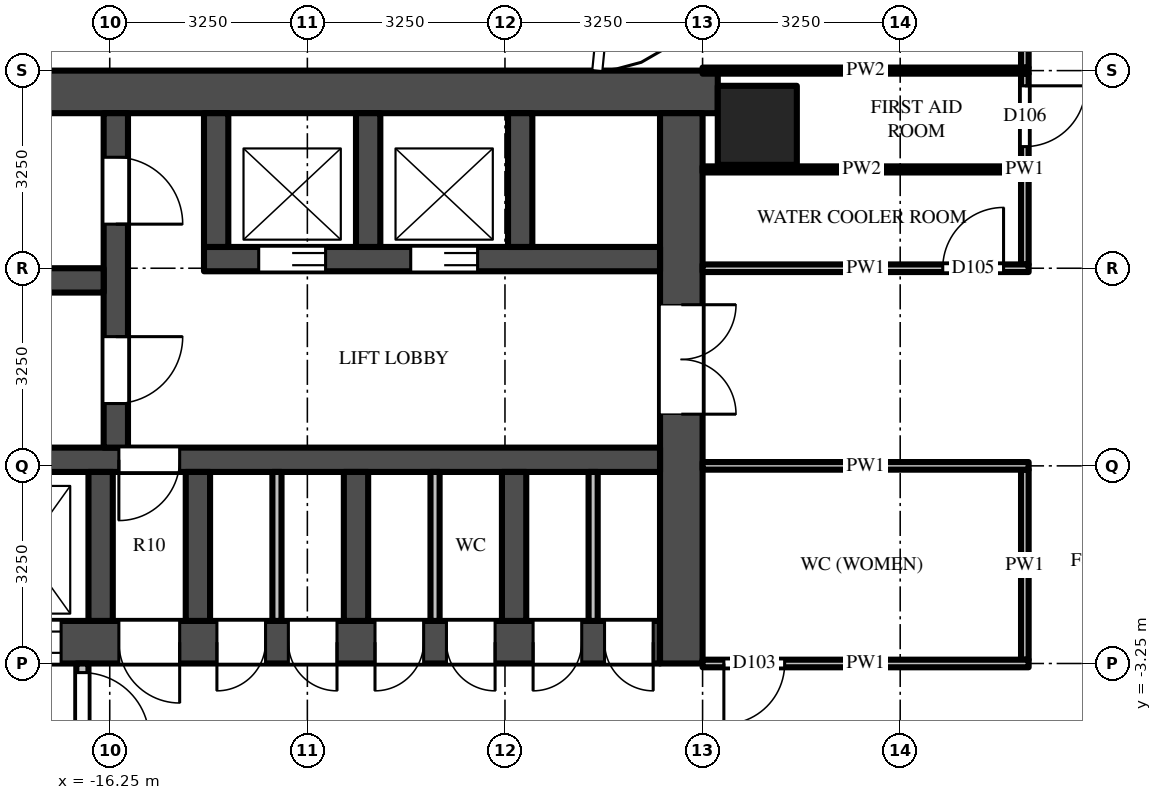
"""IFC4 building model, lengths in metres.
Left out: names, types, materials, properties, quantities, classifications, styles, units other than length and angle.
Written with IfcOpenShell. Run it as: python <this file> out.ifc"""

import sys

from ifc_helpers import new_model, si_unit, direction, frame, frame_2d, origin, origin_2d, place, context, subcontext, project, spatial, rectangle, extrude, source, transform, mapped, element, fill, save


model = new_model("IFC4")
c1 = context("Model", 3, precision=1e-05, world=origin(), true_north=direction((0.0, 1.0)))
c2 = subcontext(c1, "Body", "Model", "MODEL_VIEW")
j1 = project(units=[si_unit("LENGTHUNIT", "METRE"), si_unit("PLANEANGLEUNIT", "RADIAN")], contexts=[c1])
p1 = place(None, origin())
s1 = spatial("IfcSite", under=j1, at=p1, CompositionType="ELEMENT")
p2 = place(p1, origin())
s2 = spatial("IfcBuilding", under=s1, at=p2, CompositionType="ELEMENT")
p3 = place(p2, frame((0.0, 0.0, 120.0)))
s3 = spatial("IfcBuildingStorey", under=s2, at=p3, CompositionType="ELEMENT", Elevation=120.0)
m1 = source(origin(), c2, "Body", "SweptSolid", [
    extrude(rectangle(XDim=1.3, YDim=1.3, at=origin_2d()), origin(), (0.0, 0.0, 1.0), 4.5),
])
p4 = place(p3, frame((-5.6, 5.6, 0.0), z_axis=(0.0, 0.0, 1.0), x_axis=(1.0, 0.0, 0.0)))
e1 = element("IfcColumn", 1, at=p4, inside=s3, PredefinedType="COLUMN", context=c2, shape_type="MappedRepresentation", body=[
    mapped(m1, transform((0.0, 0.0, 0.0))),
])
m2 = source(origin(), c2, "Body", "SweptSolid", [
    extrude(rectangle(XDim=16.5, YDim=0.7, at=frame_2d((8.25, 0.0))), origin(), (0.0, 0.0, 1.0), 4.25),
])
p5 = place(p3, frame((-6.25, 6.15, 0.0), z_axis=(0.0, 0.0, 1.0), x_axis=(-1.0, 0.0, 0.0)))
e2 = element("IfcWall", 2, at=p5, inside=s3, PredefinedType="SHEAR", context=c2, shape_type="MappedRepresentation", body=[
    mapped(m2, transform((0.0, 0.0, 0.0))),
])
m3 = source(origin(), c2, "Body", "SweptSolid", [
    extrude(rectangle(XDim=14.85, YDim=0.7, at=frame_2d((7.425, 0.0))), origin(), (0.0, 0.0, 1.0), 4.25),
])
p6 = place(p3, frame((-7.2, -2.9, 0.0), z_axis=(0.0, 0.0, 1.0), x_axis=(-1.0, 0.0, 0.0)))
e3 = element("IfcWall", 3, at=p6, inside=s3, PredefinedType="SHEAR", context=c2, shape_type="MappedRepresentation", body=[
    mapped(m3, transform((0.0, 0.0, 0.0))),
])
m4 = source(origin(), c2, "Body", "SweptSolid", [
    extrude(rectangle(XDim=1.3, YDim=2.1, at=frame_2d((0.65, 1.05))), frame((0.0, 0.36, 0.0), z_axis=(0.0, -1.0, 0.0), x_axis=(1.0, 0.0, 0.0)), (0.0, 0.0, 1.0), 0.72),
])
p7 = place(p6, frame((12.2, 0.0, 0.0)))
e4 = element("IfcOpeningElement", 4, at=p7, cuts=e3, PredefinedType="OPENING", context=c2, shape_type="MappedRepresentation", body=[
    mapped(m4, transform((0.0, 0.0, 0.0))),
])
m5 = source(origin(), c2, "Body", "SweptSolid", [
    extrude(rectangle(XDim=1.2, YDim=2.1, at=frame_2d((0.6, 1.05))), frame((0.0, 0.36, 0.0), z_axis=(0.0, -1.0, 0.0), x_axis=(1.0, 0.0, 0.0)), (0.0, 0.0, 1.0), 0.72),
])
p8 = place(p6, frame((9.85, 0.0, 0.0)))
e5 = element("IfcOpeningElement", 5, at=p8, cuts=e3, PredefinedType="OPENING", context=c2, shape_type="MappedRepresentation", body=[
    mapped(m5, transform((0.0, 0.0, 0.0))),
])
m6 = source(origin(), c2, "Body", "SweptSolid", [
    extrude(rectangle(XDim=1.0, YDim=2.1, at=frame_2d((0.5, 1.05))), frame((0.0, 0.36, 0.0), z_axis=(0.0, -1.0, 0.0), x_axis=(1.0, 0.0, 0.0)), (0.0, 0.0, 1.0), 0.72),
])
p9 = place(p6, frame((7.9, 0.0, 0.0)))
e6 = element("IfcOpeningElement", 6, at=p9, cuts=e3, PredefinedType="OPENING", context=c2, shape_type="MappedRepresentation", body=[
    mapped(m6, transform((0.0, 0.0, 0.0))),
])
m7 = source(origin(), c2, "Body", "SweptSolid", [
    extrude(rectangle(XDim=0.8, YDim=2.1, at=frame_2d((0.4, 1.05))), frame((0.0, 0.36, 0.0), z_axis=(0.0, -1.0, 0.0), x_axis=(1.0, 0.0, 0.0)), (0.0, 0.0, 1.0), 0.72),
])
p10 = place(p6, frame((0.113, 0.0, 0.0)))
e7 = element("IfcOpeningElement", 7, at=p10, cuts=e3, PredefinedType="OPENING", context=c2, shape_type="MappedRepresentation", body=[
    mapped(m7, transform((0.0, 0.0, 0.0))),
])
p11 = place(p6, frame((1.288, 0.0, 0.0)))
e8 = element("IfcOpeningElement", 8, at=p11, cuts=e3, PredefinedType="OPENING", context=c2, shape_type="MappedRepresentation", body=[
    mapped(m7, transform((0.0, 0.0, 0.0))),
])
p12 = place(p6, frame((2.712, 0.0, 0.0)))
e9 = element("IfcOpeningElement", 9, at=p12, cuts=e3, PredefinedType="OPENING", context=c2, shape_type="MappedRepresentation", body=[
    mapped(m7, transform((0.0, 0.0, 0.0))),
])
p13 = place(p6, frame((3.887, 0.0, 0.0)))
e10 = element("IfcOpeningElement", 10, at=p13, cuts=e3, PredefinedType="OPENING", context=c2, shape_type="MappedRepresentation", body=[
    mapped(m7, transform((0.0, 0.0, 0.0))),
])
p14 = place(p6, frame((5.312, 0.0, 0.0)))
e11 = element("IfcOpeningElement", 11, at=p14, cuts=e3, PredefinedType="OPENING", context=c2, shape_type="MappedRepresentation", body=[
    mapped(m7, transform((0.0, 0.0, 0.0))),
])
p15 = place(p6, frame((6.488, 0.0, 0.0)))
e12 = element("IfcOpeningElement", 12, at=p15, cuts=e3, PredefinedType="OPENING", context=c2, shape_type="MappedRepresentation", body=[
    mapped(m7, transform((0.0, 0.0, 0.0))),
])
m8 = source(origin(), c2, "Body", "SweptSolid", [
    extrude(rectangle(XDim=9.05, YDim=0.7, at=frame_2d((4.525, 0.0))), origin(), (0.0, 0.0, 1.0), 4.25),
])
p16 = place(p3, frame((-6.85, 5.8, 0.0), z_axis=(0.0, 0.0, 1.0), x_axis=(0.0, -1.0, 0.0)))
e13 = element("IfcWall", 13, at=p16, inside=s3, PredefinedType="SHEAR", context=c2, shape_type="MappedRepresentation", body=[
    mapped(m8, transform((0.0, 0.0, 0.0))),
])
m9 = source(origin(), c2, "Body", "SweptSolid", [
    extrude(rectangle(XDim=1.8, YDim=2.1, at=frame_2d((0.9, 1.05))), frame((0.0, 0.36, 0.0), z_axis=(0.0, -1.0, 0.0), x_axis=(1.0, 0.0, 0.0)), (0.0, 0.0, 1.0), 0.72),
])
p17 = place(p16, frame((3.15, 0.0, 0.0)))
e14 = element("IfcOpeningElement", 14, at=p17, cuts=e13, PredefinedType="OPENING", context=c2, shape_type="MappedRepresentation", body=[
    mapped(m9, transform((0.0, 0.0, 0.0))),
])
m10 = source(origin(), c2, "Body", "SweptSolid", [
    extrude(rectangle(XDim=7.5, YDim=0.4, at=frame_2d((3.75, 0.0))), origin(), (0.0, 0.0, 1.0), 4.25),
])
p18 = place(p3, frame((-7.2, 3.4, 0.0), z_axis=(0.0, 0.0, 1.0), x_axis=(-1.0, 0.0, 0.0)))
e15 = element("IfcWall", 15, at=p18, inside=s3, PredefinedType="SHEAR", context=c2, shape_type="MappedRepresentation", body=[
    mapped(m10, transform((0.0, 0.0, 0.0))),
])
m11 = source(origin(), c2, "Body", "SweptSolid", [
    extrude(rectangle(XDim=1.1, YDim=2.1, at=frame_2d((0.55, 1.05))), frame((0.0, 0.21, 0.0), z_axis=(0.0, -1.0, 0.0), x_axis=(1.0, 0.0, 0.0)), (0.0, 0.0, 1.0), 0.42),
])
p19 = place(p18, frame((3.0, 0.0, 0.0)))
e16 = element("IfcOpeningElement", 16, at=p19, cuts=e15, PredefinedType="OPENING", context=c2, shape_type="MappedRepresentation", body=[
    mapped(m11, transform((0.0, 0.0, 0.0))),
])
p20 = place(p18, frame((5.5, 0.0, 0.0)))
e17 = element("IfcOpeningElement", 17, at=p20, cuts=e15, PredefinedType="OPENING", context=c2, shape_type="MappedRepresentation", body=[
    mapped(m11, transform((0.0, 0.0, 0.0))),
])
m12 = source(origin(), c2, "Body", "SweptSolid", [
    extrude(rectangle(XDim=14.85, YDim=0.4, at=frame_2d((7.425, 0.0))), origin(), (0.0, 0.0, 1.0), 4.25),
])
p21 = place(p3, frame((-7.2, 0.1, 0.0), z_axis=(0.0, 0.0, 1.0), x_axis=(-1.0, 0.0, 0.0)))
e18 = element("IfcWall", 18, at=p21, inside=s3, PredefinedType="SHEAR", context=c2, shape_type="MappedRepresentation", body=[
    mapped(m12, transform((0.0, 0.0, 0.0))),
])
m13 = source(origin(), c2, "Body", "SweptSolid", [
    extrude(rectangle(XDim=1.0, YDim=2.1, at=frame_2d((0.5, 1.05))), frame((0.0, 0.21, 0.0), z_axis=(0.0, -1.0, 0.0), x_axis=(1.0, 0.0, 0.0)), (0.0, 0.0, 1.0), 0.42),
])
p22 = place(p21, frame((7.9, 0.0, 0.0)))
e19 = element("IfcOpeningElement", 19, at=p22, cuts=e18, PredefinedType="OPENING", context=c2, shape_type="MappedRepresentation", body=[
    mapped(m13, transform((0.0, 0.0, 0.0))),
])
m14 = source(origin(), c2, "Body", "SweptSolid", [
    extrude(rectangle(XDim=5.5, YDim=0.4, at=frame_2d((2.75, 0.0))), origin(), (0.0, 0.0, 1.0), 4.25),
])
p23 = place(p3, frame((-16.15, 5.8, 0.0), z_axis=(0.0, 0.0, 1.0), x_axis=(0.0, -1.0, 0.0)))
e20 = element("IfcWall", 20, at=p23, inside=s3, PredefinedType="SHEAR", context=c2, shape_type="MappedRepresentation", body=[
    mapped(m14, transform((0.0, 0.0, 0.0))),
])
p24 = place(p23, frame((0.725, 0.0, 0.0)))
e21 = element("IfcOpeningElement", 21, at=p24, cuts=e20, PredefinedType="OPENING", context=c2, shape_type="MappedRepresentation", body=[
    mapped(m11, transform((0.0, 0.0, 0.0))),
])
p25 = place(p23, frame((3.675, 0.0, 0.0)))
e22 = element("IfcOpeningElement", 22, at=p25, cuts=e20, PredefinedType="OPENING", context=c2, shape_type="MappedRepresentation", body=[
    mapped(m11, transform((0.0, 0.0, 0.0))),
])
m15 = source(origin(), c2, "Body", "SweptSolid", [
    extrude(rectangle(XDim=5.7, YDim=0.4, at=frame_2d((2.85, 0.0))), origin(), (0.0, 0.0, 1.0), 4.25),
])
p26 = place(p3, frame((-16.35, 3.05, 0.0), z_axis=(0.0, 0.0, 1.0), x_axis=(-1.0, 0.0, 0.0)))
e23 = element("IfcWall", 23, at=p26, inside=s3, PredefinedType="SHEAR", context=c2, shape_type="MappedRepresentation", body=[
    mapped(m15, transform((0.0, 0.0, 0.0))),
])
m16 = source(origin(), c2, "Body", "SweptSolid", [
    extrude(rectangle(XDim=2.2, YDim=0.4, at=frame_2d((1.1, 0.0))), origin(), (0.0, 0.0, 1.0), 4.25),
])
for number, where, z_axis, x_axis in (
    (24, (-9.5, 5.8, 0.0), (0.0, 0.0, 1.0), (0.0, -1.0, 0.0)),
    (25, (-12.0, 5.8, 0.0), (0.0, 0.0, 1.0), (0.0, -1.0, 0.0)),
    (26, (-14.5, 5.8, 0.0), (0.0, 0.0, 1.0), (0.0, -1.0, 0.0)),
):
    element("IfcWall", number, at=place(p3, frame(where, z_axis=z_axis, x_axis=x_axis)), inside=s3, PredefinedType="SHEAR", context=c2, shape_type="MappedRepresentation", body=[
        mapped(m16, transform((0.0, 0.0, 0.0))),
    ])
m17 = source(origin(), c2, "Body", "SweptSolid", [
    extrude(rectangle(XDim=2.45, YDim=0.4, at=frame_2d((1.225, 0.0))), origin(), (0.0, 0.0, 1.0), 4.25),
])
for number, where, z_axis, x_axis in (
    (27, (-9.6, -0.1, 0.0), (0.0, 0.0, 1.0), (0.0, -1.0, 0.0)),
    (28, (-12.2, -0.1, 0.0), (0.0, 0.0, 1.0), (0.0, -1.0, 0.0)),
    (29, (-14.8, -0.1, 0.0), (0.0, 0.0, 1.0), (0.0, -1.0, 0.0)),
    (30, (-16.4, -0.1, 0.0), (0.0, 0.0, 1.0), (0.0, -1.0, 0.0)),
):
    element("IfcWall", number, at=place(p3, frame(where, z_axis=z_axis, x_axis=x_axis)), inside=s3, PredefinedType="SHEAR", context=c2, shape_type="MappedRepresentation", body=[
        mapped(m17, transform((0.0, 0.0, 0.0))),
    ])
m18 = source(origin(), c2, "Body", "SweptSolid", [
    extrude(rectangle(XDim=3.25, YDim=0.2, at=frame_2d((1.625, 0.0))), origin(), (0.0, 0.0, 1.0), 4.25),
])
p27 = place(p3, frame((-16.7, -3.25, 0.0), z_axis=(0.0, 0.0, 1.0), x_axis=(0.0, -1.0, 0.0)))
e31 = element("IfcWall", 31, at=p27, inside=s3, PredefinedType="PARTITIONING", context=c2, shape_type="MappedRepresentation", body=[
    mapped(m18, transform((0.0, 0.0, 0.0))),
])
m19 = source(origin(), c2, "Body", "SweptSolid", [
    extrude(rectangle(XDim=1.1, YDim=2.1, at=frame_2d((0.55, 1.05))), frame((0.0, 0.11, 0.0), z_axis=(0.0, -1.0, 0.0), x_axis=(1.0, 0.0, 0.0)), (0.0, 0.0, 1.0), 0.22),
])
p28 = place(p27, frame((0.15, 0.0, 0.0)))
e32 = element("IfcOpeningElement", 32, at=p28, cuts=e31, PredefinedType="OPENING", context=c2, shape_type="MappedRepresentation", body=[
    mapped(m19, transform((0.0, 0.0, 0.0))),
])
m20 = source(origin(), c2, "Body", "SweptSolid", [
    extrude(rectangle(XDim=2.45, YDim=0.15, at=frame_2d((1.225, 0.0))), origin(), (0.0, 0.0, 1.0), 4.25),
])
for number, where, z_axis, x_axis in (
    (33, (-8.3, -0.1, 0.0), (0.0, 0.0, 1.0), (0.0, -1.0, 0.0)),
    (34, (-10.9, -0.1, 0.0), (0.0, 0.0, 1.0), (0.0, -1.0, 0.0)),
    (35, (-13.5, -0.1, 0.0), (0.0, 0.0, 1.0), (0.0, -1.0, 0.0)),
):
    element("IfcWall", number, at=place(p3, frame(where, z_axis=z_axis, x_axis=x_axis)), inside=s3, PredefinedType="PARTITIONING", context=c2, shape_type="MappedRepresentation", body=[
        mapped(m20, transform((0.0, 0.0, 0.0))),
    ])
m21 = source(origin(), c2, "Body", "SweptSolid", [
    extrude(rectangle(XDim=3.125, YDim=0.125, at=frame_2d((1.562, 0.0))), origin(), (0.0, 0.0, 1.0), 3.546),
])
p29 = place(p3, frame((-1.2, -0.062, 0.0), z_axis=(0.0, 0.0, 1.0), x_axis=(0.0, -1.0, 0.0)))
e36 = element("IfcWall", 36, at=p29, inside=s3, PredefinedType="PARTITIONING", context=c2, shape_type="MappedRepresentation", body=[
    mapped(m21, transform((0.0, 0.0, 0.0))),
])
m22 = source(origin(), c2, "Body", "SweptSolid", [
    extrude(rectangle(XDim=3.137, YDim=0.125, at=frame_2d((1.569, 0.0))), origin(), (0.0, 0.0, 1.0), 3.468),
])
p30 = place(p3, frame((-1.2, 6.45, 0.0), z_axis=(0.0, 0.0, 1.0), x_axis=(0.0, -1.0, 0.0)))
e37 = element("IfcWall", 37, at=p30, inside=s3, PredefinedType="PARTITIONING", context=c2, shape_type="MappedRepresentation", body=[
    mapped(m22, transform((0.0, 0.0, 0.0))),
])
m23 = source(origin(), c2, "Body", "SweptSolid", [
    extrude(rectangle(XDim=1.0, YDim=2.1, at=frame_2d((0.5, 1.05))), frame((0.0, 0.073, 0.0), z_axis=(0.0, -1.0, 0.0), x_axis=(1.0, 0.0, 0.0)), (0.0, 0.0, 1.0), 0.145),
])
p31 = place(p30, frame((0.2, 0.0, 0.0)))
e38 = element("IfcOpeningElement", 38, at=p31, cuts=e37, PredefinedType="OPENING", context=c2, shape_type="MappedRepresentation", body=[
    mapped(m23, transform((0.0, 0.0, 0.0))),
])
m24 = source(origin(), c2, "Body", "SweptSolid", [
    extrude(rectangle(XDim=5.488, YDim=0.125, at=frame_2d((2.744, 0.0))), origin(), (0.0, 0.0, 1.0), 3.468),
])
p32 = place(p3, frame((-1.2, 6.55, 0.0), z_axis=(0.0, 0.0, 1.0), x_axis=(0.0, 1.0, 0.0)))
e39 = element("IfcWall", 39, at=p32, inside=s3, PredefinedType="PARTITIONING", context=c2, shape_type="MappedRepresentation", body=[
    mapped(m24, transform((0.0, 0.0, 0.0))),
])
m25 = source(origin(), c2, "Body", "SweptSolid", [
    extrude(rectangle(XDim=1.2, YDim=2.1, at=frame_2d((0.6, 1.05))), frame((0.0, 0.073, 0.0), z_axis=(0.0, -1.0, 0.0), x_axis=(1.0, 0.0, 0.0)), (0.0, 0.0, 1.0), 0.145),
])
p33 = place(p32, frame((0.3, 0.0, 0.0)))
e40 = element("IfcOpeningElement", 40, at=p33, cuts=e39, PredefinedType="OPENING", context=c2, shape_type="MappedRepresentation", body=[
    mapped(m25, transform((0.0, 0.0, 0.0))),
])
m26 = source(origin(), c2, "Body", "SweptSolid", [
    extrude(rectangle(XDim=5.363, YDim=0.125, at=frame_2d((2.681, 0.0))), origin(), (0.0, 0.0, 1.0), 3.468),
])
p34 = place(p3, frame((-1.137, -3.25, 0.0), z_axis=(0.0, 0.0, 1.0), x_axis=(-1.0, 0.0, 0.0)))
e41 = element("IfcWall", 41, at=p34, inside=s3, PredefinedType="PARTITIONING", context=c2, shape_type="MappedRepresentation", body=[
    mapped(m26, transform((0.0, 0.0, 0.0))),
])
p35 = place(p34, frame((4.012, 0.0, 0.0)))
e42 = element("IfcOpeningElement", 42, at=p35, cuts=e41, PredefinedType="OPENING", context=c2, shape_type="MappedRepresentation", body=[
    mapped(m23, transform((0.0, 0.0, 0.0))),
])
p36 = place(p3, frame((-1.137, 0.0, 0.0), z_axis=(0.0, 0.0, 1.0), x_axis=(-1.0, 0.0, 0.0)))
e43 = element("IfcWall", 43, at=p36, inside=s3, PredefinedType="PARTITIONING", context=c2, shape_type="MappedRepresentation", body=[
    mapped(m26, transform((0.0, 0.0, 0.0))),
])
p37 = place(p3, frame((-6.5, 3.25, 0.0), z_axis=(0.0, 0.0, 1.0), x_axis=(1.0, 0.0, 0.0)))
e44 = element("IfcWall", 44, at=p37, inside=s3, PredefinedType="PARTITIONING", context=c2, shape_type="MappedRepresentation", body=[
    mapped(m26, transform((0.0, 0.0, 0.0))),
])
p38 = place(p37, frame((3.95, 0.0, 0.0)))
e45 = element("IfcOpeningElement", 45, at=p38, cuts=e44, PredefinedType="OPENING", context=c2, shape_type="MappedRepresentation", body=[
    mapped(m23, transform((0.0, 0.0, 0.0))),
])
m27 = source(origin(), c2, "Body", "SweptSolid", [
    extrude(rectangle(XDim=5.238, YDim=0.1, at=frame_2d((2.619, 0.0))), origin(), (0.0, 0.0, 1.0), 3.468),
])
p39 = place(p3, frame((-6.5, 4.875, 0.0), z_axis=(0.0, 0.0, 1.0), x_axis=(1.0, 0.0, 0.0)))
e46 = element("IfcWall", 46, at=p39, inside=s3, PredefinedType="PARTITIONING", context=c2, shape_type="MappedRepresentation", body=[
    mapped(m27, transform((0.0, 0.0, 0.0))),
])
m28 = source(origin(), c2, "Body", "SweptSolid", [
    extrude(rectangle(XDim=5.363, YDim=0.1, at=frame_2d((2.681, 0.0))), origin(), (0.0, 0.0, 1.0), 3.33),
])
p40 = place(p3, frame((-6.5, 6.5, 0.0), z_axis=(0.0, 0.0, 1.0), x_axis=(1.0, 0.0, 0.0)))
e47 = element("IfcWall", 47, at=p40, inside=s3, PredefinedType="PARTITIONING", context=c2, shape_type="MappedRepresentation", body=[
    mapped(m28, transform((0.0, 0.0, 0.0))),
])
m29 = source(origin(), c2, "Body", "SweptSolid", [
    extrude(rectangle(XDim=1.1, YDim=2.1, at=frame_2d((0.55, 1.05))), frame((0.0, 0.025, 0.0), z_axis=(0.0, -1.0, 0.0), x_axis=(1.0, 0.0, 0.0)), (0.0, 0.0, 1.0), 0.05),
])
p41 = place(p19, origin())
e48 = element("IfcDoor", 48, at=p41, inside=s3, OperationType="DOUBLE_DOOR_SLIDING", PredefinedType="DOOR", context=c2, shape_type="MappedRepresentation", body=[
    mapped(m29, transform((0.0, 0.0, 0.0))),
])
fill(e16, e48)
p42 = place(p20, origin())
e49 = element("IfcDoor", 49, at=p42, inside=s3, OperationType="DOUBLE_DOOR_SLIDING", PredefinedType="DOOR", context=c2, shape_type="MappedRepresentation", body=[
    mapped(m29, transform((0.0, 0.0, 0.0))),
])
fill(e17, e49)
m30 = source(origin(), c2, "Body", "SweptSolid", [
    extrude(rectangle(XDim=1.2, YDim=2.1, at=frame_2d((0.6, 1.05))), frame((0.0, -0.275, 0.0), z_axis=(0.0, -1.0, 0.0), x_axis=(1.0, 0.0, 0.0)), (0.0, 0.0, 1.0), 0.05),
])
p43 = place(p8, origin())
e50 = element("IfcDoor", 50, at=p43, inside=s3, OperationType="DOUBLE_DOOR_SLIDING", PredefinedType="DOOR", context=c2, shape_type="MappedRepresentation", body=[
    mapped(m30, transform((0.0, 0.0, 0.0))),
])
fill(e5, e50)
m31 = source(origin(), c2, "Body", "SweptSolid", [
    extrude(rectangle(XDim=1.8, YDim=2.1, at=frame_2d((0.9, 1.05))), frame((0.0, -0.275, 0.0), z_axis=(0.0, -1.0, 0.0), x_axis=(1.0, 0.0, 0.0)), (0.0, 0.0, 1.0), 0.05),
])
p44 = place(p17, origin())
e51 = element("IfcDoor", 51, at=p44, inside=s3, OperationType="DOUBLE_DOOR_SINGLE_SWING", PredefinedType="DOOR", context=c2, shape_type="MappedRepresentation", body=[
    mapped(m31, transform((0.0, 0.0, 0.0))),
])
fill(e14, e51)
p45 = place(p24, origin())
e52 = element("IfcDoor", 52, at=p45, inside=s3, OperationType="SINGLE_SWING_RIGHT", PredefinedType="DOOR", context=c2, shape_type="MappedRepresentation", body=[
    mapped(m29, transform((0.0, 0.0, 0.0))),
])
fill(e21, e52)
p46 = place(p25, origin())
e53 = element("IfcDoor", 53, at=p46, inside=s3, OperationType="SINGLE_SWING_LEFT", PredefinedType="DOOR", context=c2, shape_type="MappedRepresentation", body=[
    mapped(m29, transform((0.0, 0.0, 0.0))),
])
fill(e22, e53)
m32 = source(origin(), c2, "Body", "SweptSolid", [
    extrude(rectangle(XDim=1.0, YDim=2.1, at=frame_2d((0.5, 1.05))), frame((0.0, 0.025, 0.0), z_axis=(0.0, -1.0, 0.0), x_axis=(1.0, 0.0, 0.0)), (0.0, 0.0, 1.0), 0.05),
])
p47 = place(p22, origin())
e54 = element("IfcDoor", 54, at=p47, inside=s3, OperationType="SINGLE_SWING_RIGHT", PredefinedType="DOOR", context=c2, shape_type="MappedRepresentation", body=[
    mapped(m32, transform((0.0, 0.0, 0.0))),
])
fill(e19, e54)
m33 = source(origin(), c2, "Body", "SweptSolid", [
    extrude(rectangle(XDim=1.0, YDim=2.1, at=frame_2d((0.5, 1.05))), frame((0.0, -0.275, 0.0), z_axis=(0.0, -1.0, 0.0), x_axis=(1.0, 0.0, 0.0)), (0.0, 0.0, 1.0), 0.05),
])
p48 = place(p9, origin())
e55 = element("IfcDoor", 55, at=p48, inside=s3, OperationType="SINGLE_SWING_LEFT", PredefinedType="DOOR", context=c2, shape_type="MappedRepresentation", body=[
    mapped(m33, transform((0.0, 0.0, 0.0))),
])
fill(e6, e55)
p49 = place(p28, origin())
e56 = element("IfcDoor", 56, at=p49, inside=s3, OperationType="SINGLE_SWING_RIGHT", PredefinedType="DOOR", context=c2, shape_type="MappedRepresentation", body=[
    mapped(m29, transform((0.0, 0.0, 0.0))),
])
fill(e32, e56)
m34 = source(origin(), c2, "Body", "SweptSolid", [
    extrude(rectangle(XDim=0.8, YDim=2.1, at=frame_2d((0.4, 1.05))), frame((0.0, -0.275, 0.0), z_axis=(0.0, -1.0, 0.0), x_axis=(1.0, 0.0, 0.0)), (0.0, 0.0, 1.0), 0.05),
])
p50 = place(p10, origin())
e57 = element("IfcDoor", 57, at=p50, inside=s3, OperationType="SINGLE_SWING_LEFT", PredefinedType="DOOR", context=c2, shape_type="MappedRepresentation", body=[
    mapped(m34, transform((0.0, 0.0, 0.0))),
])
fill(e7, e57)
p51 = place(p11, origin())
e58 = element("IfcDoor", 58, at=p51, inside=s3, OperationType="SINGLE_SWING_RIGHT", PredefinedType="DOOR", context=c2, shape_type="MappedRepresentation", body=[
    mapped(m34, transform((0.0, 0.0, 0.0))),
])
fill(e8, e58)
p52 = place(p12, origin())
e59 = element("IfcDoor", 59, at=p52, inside=s3, OperationType="SINGLE_SWING_LEFT", PredefinedType="DOOR", context=c2, shape_type="MappedRepresentation", body=[
    mapped(m34, transform((0.0, 0.0, 0.0))),
])
fill(e9, e59)
p53 = place(p13, origin())
e60 = element("IfcDoor", 60, at=p53, inside=s3, OperationType="SINGLE_SWING_RIGHT", PredefinedType="DOOR", context=c2, shape_type="MappedRepresentation", body=[
    mapped(m34, transform((0.0, 0.0, 0.0))),
])
fill(e10, e60)
p54 = place(p14, origin())
e61 = element("IfcDoor", 61, at=p54, inside=s3, OperationType="SINGLE_SWING_LEFT", PredefinedType="DOOR", context=c2, shape_type="MappedRepresentation", body=[
    mapped(m34, transform((0.0, 0.0, 0.0))),
])
fill(e11, e61)
p55 = place(p15, origin())
e62 = element("IfcDoor", 62, at=p55, inside=s3, OperationType="SINGLE_SWING_RIGHT", PredefinedType="DOOR", context=c2, shape_type="MappedRepresentation", body=[
    mapped(m34, transform((0.0, 0.0, 0.0))),
])
fill(e12, e62)
p56 = place(p35, origin())
e63 = element("IfcDoor", 63, at=p56, inside=s3, OperationType="SINGLE_SWING_RIGHT", PredefinedType="DOOR", context=c2, shape_type="MappedRepresentation", body=[
    mapped(m32, transform((0.0, 0.0, 0.0))),
])
fill(e42, e63)
p57 = place(p38, origin())
e64 = element("IfcDoor", 64, at=p57, inside=s3, OperationType="SINGLE_SWING_RIGHT", PredefinedType="DOOR", context=c2, shape_type="MappedRepresentation", body=[
    mapped(m32, transform((0.0, 0.0, 0.0))),
])
fill(e45, e64)
p58 = place(p31, origin())
e65 = element("IfcDoor", 65, at=p58, inside=s3, OperationType="SINGLE_SWING_LEFT", PredefinedType="DOOR", context=c2, shape_type="MappedRepresentation", body=[
    mapped(m32, transform((0.0, 0.0, 0.0))),
])
fill(e38, e65)
save(model, sys.argv[1])
